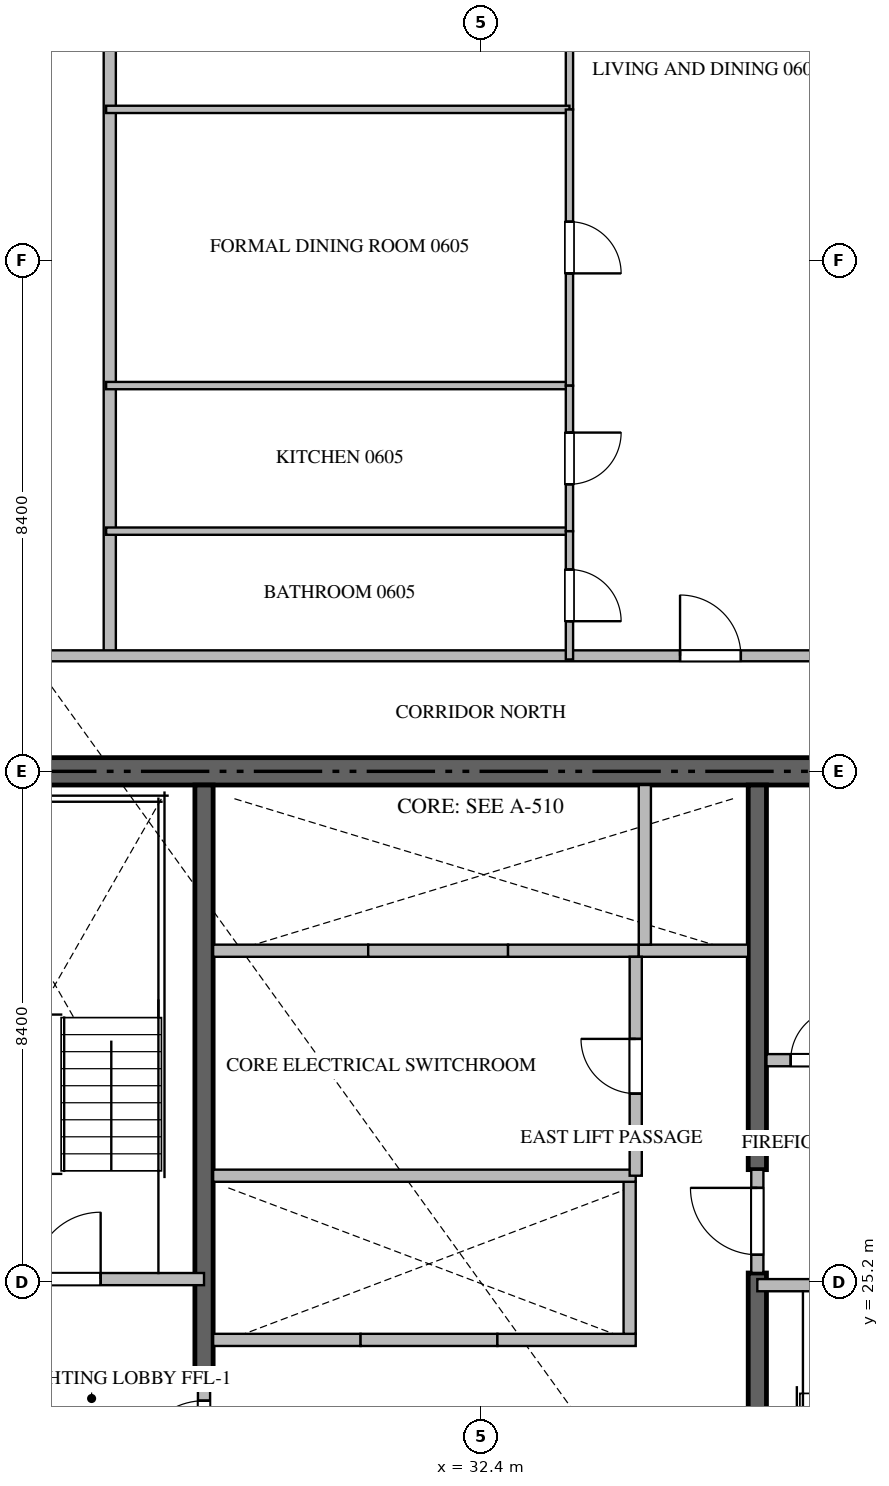
"""IFC4 building model, lengths in metres.
Left out: names, types, materials, properties, quantities, classifications, styles, units other than length and angle.
Written with IfcOpenShell. Run it as: python <this file> out.ifc"""

import sys

from ifc_helpers import new_model, si_unit, direction, frame, frame_2d, origin, place, context, subcontext, project, spatial, rectangle, extrude, source, transform, mapped, element, fill, save


model = new_model("IFC4")
c1 = context("Model", 3, precision=1e-05, world=origin(), true_north=direction((0.0, 1.0)))
c2 = subcontext(c1, "Body", "Model", "MODEL_VIEW")
j1 = project(units=[si_unit("LENGTHUNIT", "METRE"), si_unit("PLANEANGLEUNIT", "RADIAN")], contexts=[c1])
p1 = place(None, origin())
s1 = spatial("IfcSite", under=j1, at=p1, CompositionType="ELEMENT")
p2 = place(p1, origin())
s2 = spatial("IfcBuilding", under=s1, at=p2, CompositionType="ELEMENT")
p3 = place(p2, frame((0.0, 0.0, 30.45)))
s3 = spatial("IfcBuildingStorey", under=s2, at=p3, CompositionType="ELEMENT", Elevation=30.45)
p4 = place(p3, frame((41.4, 33.6, -0.26), z_axis=(0.0, 0.0, 1.0), x_axis=(-1.0, 0.0, 0.0)))
e1 = element("IfcWall", 1, at=p4, inside=s3, PredefinedType="SHEAR", context=c2, shape_type="SweptSolid", body=[
    extrude(rectangle(XDim=18.0, YDim=0.45, at=frame_2d((9.0, 0.0))), origin(), (0.0, 0.0, 1.0), 3.748),
])
p5 = place(p3, frame((27.85, 23.55, -0.26), z_axis=(0.0, 0.0, 1.0), x_axis=(0.0, 1.0, 0.0)))
e2 = element("IfcWall", 2, at=p5, inside=s3, PredefinedType="SHEAR", context=c2, shape_type="SweptSolid", body=[
    extrude(rectangle(XDim=9.825, YDim=0.3, at=frame_2d((4.913, 0.0))), origin(), (0.0, 0.0, 1.0), 3.748),
])
p6 = place(p3, frame((36.95, 17.025, -0.26), z_axis=(0.0, 0.0, 1.0), x_axis=(0.0, 1.0, 0.0)))
e3 = element("IfcWall", 3, at=p6, inside=s3, PredefinedType="SHEAR", context=c2, shape_type="SweptSolid", body=[
    extrude(rectangle(XDim=8.325, YDim=0.3, at=frame_2d((4.163, 0.0))), origin(), (0.0, 0.0, 1.0), 3.748),
])
p7 = place(p3, frame((36.95, 27.05, -0.26), z_axis=(0.0, 0.0, 1.0), x_axis=(0.0, 1.0, 0.0)))
e4 = element("IfcWall", 4, at=p7, inside=s3, PredefinedType="SHEAR", context=c2, shape_type="SweptSolid", body=[
    extrude(rectangle(XDim=6.325, YDim=0.3, at=frame_2d((3.163, 0.0))), origin(), (0.0, 0.0, 1.0), 3.748),
])
p8 = place(p3, frame((23.4, 25.25, 0.0), z_axis=(0.0, 0.0, 1.0), x_axis=(1.0, 0.0, 0.0)))
e5 = element("IfcWall", 5, at=p8, inside=s3, PredefinedType="STANDARD", context=c2, shape_type="SweptSolid", body=[
    extrude(rectangle(XDim=4.45, YDim=0.2, at=frame_2d((2.225, 0.0))), origin(), (0.0, 0.0, 1.0), 3.49),
])
p9 = place(p8, frame((1.65, 0.0, 0.0)))
e6 = element("IfcOpeningElement", 6, at=p9, cuts=e5, PredefinedType="OPENING", context=c2, shape_type="SweptSolid", body=[
    extrude(rectangle(XDim=1.1, YDim=2.15, at=frame_2d((0.55, 1.075))), frame((0.0, 0.11, 0.0), z_axis=(0.0, -1.0, 0.0), x_axis=(1.0, 0.0, 0.0)), (0.0, 0.0, 1.0), 0.22),
])
p10 = place(p3, frame((36.95, 25.15, 0.0), z_axis=(0.0, 0.0, 1.0), x_axis=(1.0, 0.0, 0.0)))
e7 = element("IfcWall", 7, at=p10, inside=s3, PredefinedType="STANDARD", context=c2, shape_type="SweptSolid", body=[
    extrude(rectangle(XDim=4.45, YDim=0.2, at=frame_2d((2.225, 0.0))), origin(), (0.0, 0.0, 1.0), 3.49),
])
p11 = place(p10, frame((1.65, 0.0, 0.0)))
e8 = element("IfcOpeningElement", 8, at=p11, cuts=e7, PredefinedType="OPENING", context=c2, shape_type="SweptSolid", body=[
    extrude(rectangle(XDim=1.1, YDim=2.15, at=frame_2d((0.55, 1.075))), frame((0.0, 0.11, 0.0), z_axis=(0.0, -1.0, 0.0), x_axis=(1.0, 0.0, 0.0)), (0.0, 0.0, 1.0), 0.22),
])
p12 = place(p3, frame((28.0, 24.25, 0.0), z_axis=(0.0, 0.0, 1.0), x_axis=(1.0, 0.0, 0.0)))
e9 = element("IfcWall", 9, at=p12, inside=s3, PredefinedType="STANDARD", context=c2, shape_type="SweptSolid", body=[
    extrude(rectangle(XDim=2.425, YDim=0.2, at=frame_2d((1.212, 0.0))), origin(), (0.0, 0.0, 1.0), 3.49),
])
p13 = place(p3, frame((30.425, 24.25, 0.0), z_axis=(0.0, 0.0, 1.0), x_axis=(1.0, 0.0, 0.0)))
e10 = element("IfcWall", 10, at=p13, inside=s3, PredefinedType="STANDARD", context=c2, shape_type="SweptSolid", body=[
    extrude(rectangle(XDim=2.25, YDim=0.2, at=frame_2d((1.125, 0.0))), origin(), (0.0, 0.0, 1.0), 3.49),
])
p14 = place(p3, frame((32.675, 24.25, 0.0), z_axis=(0.0, 0.0, 1.0), x_axis=(1.0, 0.0, 0.0)))
e11 = element("IfcWall", 11, at=p14, inside=s3, PredefinedType="STANDARD", context=c2, shape_type="SweptSolid", body=[
    extrude(rectangle(XDim=2.275, YDim=0.2, at=frame_2d((1.137, 0.0))), origin(), (0.0, 0.0, 1.0), 3.49),
])
p15 = place(p3, frame((34.85, 24.35, 0.0), z_axis=(0.0, 0.0, 1.0), x_axis=(0.0, 1.0, 0.0)))
e12 = element("IfcWall", 12, at=p15, inside=s3, PredefinedType="STANDARD", context=c2, shape_type="SweptSolid", body=[
    extrude(rectangle(XDim=2.5, YDim=0.2, at=frame_2d((1.25, 0.0))), origin(), (0.0, 0.0, 1.0), 3.49),
])
p16 = place(p3, frame((28.0, 30.65, 0.0), z_axis=(0.0, 0.0, 1.0), x_axis=(1.0, 0.0, 0.0)))
e13 = element("IfcWall", 13, at=p16, inside=s3, PredefinedType="STANDARD", context=c2, shape_type="SweptSolid", body=[
    extrude(rectangle(XDim=2.55, YDim=0.2, at=frame_2d((1.275, 0.0))), origin(), (0.0, 0.0, 1.0), 3.49),
])
p17 = place(p3, frame((30.55, 30.65, 0.0), z_axis=(0.0, 0.0, 1.0), x_axis=(1.0, 0.0, 0.0)))
e14 = element("IfcWall", 14, at=p17, inside=s3, PredefinedType="STANDARD", context=c2, shape_type="SweptSolid", body=[
    extrude(rectangle(XDim=2.3, YDim=0.2, at=frame_2d((1.15, 0.0))), origin(), (0.0, 0.0, 1.0), 3.49),
])
p18 = place(p3, frame((32.85, 30.65, 0.0), z_axis=(0.0, 0.0, 1.0), x_axis=(1.0, 0.0, 0.0)))
e15 = element("IfcWall", 15, at=p18, inside=s3, PredefinedType="STANDARD", context=c2, shape_type="SweptSolid", body=[
    extrude(rectangle(XDim=2.15, YDim=0.2, at=frame_2d((1.075, 0.0))), origin(), (0.0, 0.0, 1.0), 3.49),
])
p19 = place(p3, frame((35.0, 30.65, 0.0), z_axis=(0.0, 0.0, 1.0), x_axis=(1.0, 0.0, 0.0)))
e16 = element("IfcWall", 16, at=p19, inside=s3, PredefinedType="STANDARD", context=c2, shape_type="SweptSolid", body=[
    extrude(rectangle(XDim=1.8, YDim=0.2, at=frame_2d((0.9, 0.0))), origin(), (0.0, 0.0, 1.0), 3.49),
])
p20 = place(p3, frame((35.1, 30.75, 0.0), z_axis=(0.0, 0.0, 1.0), x_axis=(0.0, 1.0, 0.0)))
e17 = element("IfcWall", 17, at=p20, inside=s3, PredefinedType="STANDARD", context=c2, shape_type="SweptSolid", body=[
    extrude(rectangle(XDim=2.625, YDim=0.2, at=frame_2d((1.312, 0.0))), origin(), (0.0, 0.0, 1.0), 3.49),
])
p21 = place(p3, frame((37.1, 28.85, 0.0), z_axis=(0.0, 0.0, 1.0), x_axis=(1.0, 0.0, 0.0)))
e18 = element("IfcWall", 18, at=p21, inside=s3, PredefinedType="STANDARD", context=c2, shape_type="SweptSolid", body=[
    extrude(rectangle(XDim=1.648, YDim=0.2, at=frame_2d((0.824, 0.0))), origin(), (0.0, 0.0, 1.0), 3.49),
])
p22 = place(p21, frame((0.399, 0.0, 0.0)))
e19 = element("IfcOpeningElement", 19, at=p22, cuts=e18, PredefinedType="OPENING", context=c2, shape_type="SweptSolid", body=[
    extrude(rectangle(XDim=0.85, YDim=2.1, at=frame_2d((0.425, 1.05))), frame((0.0, 0.11, 0.0), z_axis=(0.0, -1.0, 0.0), x_axis=(1.0, 0.0, 0.0)), (0.0, 0.0, 1.0), 0.22),
])
p23 = place(p3, frame((27.85, 21.852, 0.0), z_axis=(0.0, 0.0, 1.0), x_axis=(0.0, 1.0, 0.0)))
e20 = element("IfcWall", 20, at=p23, inside=s3, PredefinedType="STANDARD", context=c2, shape_type="SweptSolid", body=[
    extrude(rectangle(XDim=1.696, YDim=0.2, at=frame_2d((0.848, 0.0))), origin(), (0.0, 0.0, 1.0), 3.49),
])
p24 = place(p23, frame((0.298, 0.0, 0.0)))
e21 = element("IfcOpeningElement", 21, at=p24, cuts=e20, PredefinedType="OPENING", context=c2, shape_type="SweptSolid", body=[
    extrude(rectangle(XDim=1.1, YDim=2.15, at=frame_2d((0.55, 1.075))), frame((0.0, 0.11, 0.0), z_axis=(0.0, -1.0, 0.0), x_axis=(1.0, 0.0, 0.0)), (0.0, 0.0, 1.0), 0.22),
])
p25 = place(p3, frame((36.95, 25.352, 0.0), z_axis=(0.0, 0.0, 1.0), x_axis=(0.0, 1.0, 0.0)))
e22 = element("IfcWall", 22, at=p25, inside=s3, PredefinedType="STANDARD", context=c2, shape_type="SweptSolid", body=[
    extrude(rectangle(XDim=1.696, YDim=0.2, at=frame_2d((0.848, 0.0))), origin(), (0.0, 0.0, 1.0), 3.49),
])
p26 = place(p25, frame((0.298, 0.0, 0.0)))
e23 = element("IfcOpeningElement", 23, at=p26, cuts=e22, PredefinedType="OPENING", context=c2, shape_type="SweptSolid", body=[
    extrude(rectangle(XDim=1.1, YDim=2.15, at=frame_2d((0.55, 1.075))), frame((0.0, 0.11, 0.0), z_axis=(0.0, -1.0, 0.0), x_axis=(1.0, 0.0, 0.0)), (0.0, 0.0, 1.0), 0.22),
])
p27 = place(p3, frame((28.0, 26.95, 0.0), z_axis=(0.0, 0.0, 1.0), x_axis=(1.0, 0.0, 0.0)))
e24 = element("IfcWall", 24, at=p27, inside=s3, PredefinedType="STANDARD", context=c2, shape_type="SweptSolid", body=[
    extrude(rectangle(XDim=6.95, YDim=0.2, at=frame_2d((3.475, 0.0))), origin(), (0.0, 0.0, 1.0), 3.49),
])
p28 = place(p3, frame((34.95, 26.95, 0.0), z_axis=(0.0, 0.0, 1.0), x_axis=(0.0, 1.0, 0.0)))
e25 = element("IfcWall", 25, at=p28, inside=s3, PredefinedType="STANDARD", context=c2, shape_type="SweptSolid", body=[
    extrude(rectangle(XDim=3.6, YDim=0.2, at=frame_2d((1.8, 0.0))), origin(), (0.0, 0.0, 1.0), 3.49),
])
p29 = place(p28, frame((1.35, 0.0, 0.0)))
e26 = element("IfcOpeningElement", 26, at=p29, cuts=e25, PredefinedType="OPENING", context=c2, shape_type="SweptSolid", body=[
    extrude(rectangle(XDim=0.9, YDim=2.1, at=frame_2d((0.45, 1.05))), frame((0.0, 0.11, 0.0), z_axis=(0.0, -1.0, 0.0), x_axis=(1.0, 0.0, 0.0)), (0.0, 0.0, 1.0), 0.22),
])
p30 = place(p3, frame((26.3, 35.5, 0.0), z_axis=(0.0, 0.0, 1.0), x_axis=(0.0, 1.0, 0.0)))
e27 = element("IfcWall", 27, at=p30, inside=s3, PredefinedType="PARTITIONING", context=c2, shape_type="SweptSolid", body=[
    extrude(rectangle(XDim=14.618, YDim=0.2, at=frame_2d((7.309, 0.0))), origin(), (0.0, 0.0, 1.0), 3.49),
])
p31 = place(p3, frame((21.402, 35.5, 0.0), z_axis=(0.0, 0.0, 1.0), x_axis=(1.0, 0.0, 0.0)))
e28 = element("IfcWall", 28, at=p31, inside=s3, PredefinedType="PARTITIONING", context=c2, shape_type="SweptSolid", body=[
    extrude(rectangle(XDim=21.996, YDim=0.18, at=frame_2d((10.998, 0.0))), origin(), (0.0, 0.0, 1.0), 3.49),
])
p32 = place(p31, frame((2.1, 0.0, 0.0)))
e29 = element("IfcOpeningElement", 29, at=p32, cuts=e28, PredefinedType="OPENING", context=c2, shape_type="SweptSolid", body=[
    extrude(rectangle(XDim=1.0, YDim=2.15, at=frame_2d((0.5, 1.075))), frame((0.0, 0.1, 0.0), z_axis=(0.0, -1.0, 0.0), x_axis=(1.0, 0.0, 0.0)), (0.0, 0.0, 1.0), 0.2),
])
p33 = place(p31, frame((14.277, 0.0, 0.0)))
e30 = element("IfcOpeningElement", 30, at=p33, cuts=e28, PredefinedType="OPENING", context=c2, shape_type="SweptSolid", body=[
    extrude(rectangle(XDim=1.0, YDim=2.15, at=frame_2d((0.5, 1.075))), frame((0.0, 0.1, 0.0), z_axis=(0.0, -1.0, 0.0), x_axis=(1.0, 0.0, 0.0)), (0.0, 0.0, 1.0), 0.2),
])
p34 = place(p31, frame((18.896, 0.0, 0.0)))
e31 = element("IfcOpeningElement", 31, at=p34, cuts=e28, PredefinedType="OPENING", context=c2, shape_type="SweptSolid", body=[
    extrude(rectangle(XDim=1.0, YDim=2.15, at=frame_2d((0.5, 1.075))), frame((0.0, 0.1, 0.0), z_axis=(0.0, -1.0, 0.0), x_axis=(1.0, 0.0, 0.0)), (0.0, 0.0, 1.0), 0.2),
])
p35 = place(p3, frame((33.86, 50.105, 0.0), z_axis=(0.0, 0.0, 1.0), x_axis=(0.0, -1.0, 0.0)))
e32 = element("IfcWall", 32, at=p35, inside=s3, PredefinedType="PARTITIONING", context=c2, shape_type="SweptSolid", body=[
    extrude(rectangle(XDim=5.619, YDim=0.12, at=frame_2d((2.81, 0.0))), origin(), (0.0, 0.0, 1.0), 3.49),
])
p36 = place(p35, frame((2.595, 0.0, 0.0)))
e33 = element("IfcOpeningElement", 33, at=p36, cuts=e32, PredefinedType="OPENING", context=c2, shape_type="SweptSolid", body=[
    extrude(rectangle(XDim=0.9, YDim=2.1, at=frame_2d((0.45, 1.05))), frame((0.0, 0.07, 0.0), z_axis=(0.0, -1.0, 0.0), x_axis=(1.0, 0.0, 0.0)), (0.0, 0.0, 1.0), 0.14),
])
for number, where, z_axis, x_axis in (
    (34, (26.24, 44.486, 0.0), (0.0, 0.0, 1.0), (1.0, 0.0, 0.0)),
    (35, (26.24, 39.944, 0.0), (0.0, 0.0, 1.0), (1.0, 0.0, 0.0)),
    (36, (26.24, 37.55, 0.0), (0.0, 0.0, 1.0), (1.0, 0.0, 0.0)),
):
    element("IfcWall", number, at=place(p3, frame(where, z_axis=z_axis, x_axis=x_axis)), inside=s3, PredefinedType="PARTITIONING", context=c2, shape_type="SweptSolid", body=[
        extrude(rectangle(XDim=7.62, YDim=0.12, at=frame_2d((3.81, 0.0))), origin(), (0.0, 0.0, 1.0), 3.49),
    ])
p37 = place(p3, frame((33.86, 44.484, 0.0), z_axis=(0.0, 0.0, 1.0), x_axis=(0.0, -1.0, 0.0)))
e37 = element("IfcWall", 37, at=p37, inside=s3, PredefinedType="PARTITIONING", context=c2, shape_type="SweptSolid", body=[
    extrude(rectangle(XDim=4.54, YDim=0.12, at=frame_2d((2.27, 0.0))), origin(), (0.0, 0.0, 1.0), 3.49),
])
p38 = place(p37, frame((1.845, 0.0, 0.0)))
e38 = element("IfcOpeningElement", 38, at=p38, cuts=e37, PredefinedType="OPENING", context=c2, shape_type="SweptSolid", body=[
    extrude(rectangle(XDim=0.85, YDim=2.1, at=frame_2d((0.425, 1.05))), frame((0.0, 0.07, 0.0), z_axis=(0.0, -1.0, 0.0), x_axis=(1.0, 0.0, 0.0)), (0.0, 0.0, 1.0), 0.14),
])
p39 = place(p3, frame((33.86, 39.942, 0.0), z_axis=(0.0, 0.0, 1.0), x_axis=(0.0, -1.0, 0.0)))
e39 = element("IfcWall", 39, at=p39, inside=s3, PredefinedType="PARTITIONING", context=c2, shape_type="SweptSolid", body=[
    extrude(rectangle(XDim=2.392, YDim=0.12, at=frame_2d((1.196, 0.0))), origin(), (0.0, 0.0, 1.0), 3.49),
])
p40 = place(p39, frame((0.771, 0.0, 0.0)))
e40 = element("IfcOpeningElement", 40, at=p40, cuts=e39, PredefinedType="OPENING", context=c2, shape_type="SweptSolid", body=[
    extrude(rectangle(XDim=0.85, YDim=2.1, at=frame_2d((0.425, 1.05))), frame((0.0, 0.07, 0.0), z_axis=(0.0, -1.0, 0.0), x_axis=(1.0, 0.0, 0.0)), (0.0, 0.0, 1.0), 0.14),
])
p41 = place(p3, frame((33.86, 37.548, 0.0), z_axis=(0.0, 0.0, 1.0), x_axis=(0.0, -1.0, 0.0)))
e41 = element("IfcWall", 41, at=p41, inside=s3, PredefinedType="PARTITIONING", context=c2, shape_type="SweptSolid", body=[
    extrude(rectangle(XDim=2.108, YDim=0.12, at=frame_2d((1.054, 0.0))), origin(), (0.0, 0.0, 1.0), 3.49),
])
p42 = place(p41, frame((0.629, 0.0, 0.0)))
e42 = element("IfcOpeningElement", 42, at=p42, cuts=e41, PredefinedType="OPENING", context=c2, shape_type="SweptSolid", body=[
    extrude(rectangle(XDim=0.85, YDim=2.1, at=frame_2d((0.425, 1.05))), frame((0.0, 0.07, 0.0), z_axis=(0.0, -1.0, 0.0), x_axis=(1.0, 0.0, 0.0)), (0.0, 0.0, 1.0), 0.14),
])
m1 = source(origin(), c2, "Body", "SweptSolid", [
    extrude(rectangle(XDim=1.1, YDim=2.15, at=frame_2d((0.55, 1.075))), frame((0.0, 0.025, 0.0), z_axis=(0.0, -1.0, 0.0), x_axis=(1.0, 0.0, 0.0)), (0.0, 0.0, 1.0), 0.05),
])
p43 = place(p9, origin())
e43 = element("IfcDoor", 43, at=p43, inside=s3, OperationType="SINGLE_SWING_RIGHT", PredefinedType="DOOR", context=c2, shape_type="MappedRepresentation", body=[
    mapped(m1, transform((0.0, 0.0, 0.0), scale=1.0)),
])
fill(e6, e43)
m2 = source(origin(), c2, "Body", "SweptSolid", [
    extrude(rectangle(XDim=0.85, YDim=2.1, at=frame_2d((0.425, 1.05))), frame((0.0, 0.025, 0.0), z_axis=(0.0, -1.0, 0.0), x_axis=(1.0, 0.0, 0.0)), (0.0, 0.0, 1.0), 0.05),
])
p44 = place(p22, origin())
e44 = element("IfcDoor", 44, at=p44, inside=s3, OperationType="SINGLE_SWING_RIGHT", PredefinedType="DOOR", context=c2, shape_type="MappedRepresentation", body=[
    mapped(m2, transform((0.0, 0.0, 0.0), scale=1.0)),
])
fill(e19, e44)
p45 = place(p24, origin())
e45 = element("IfcDoor", 45, at=p45, inside=s3, OperationType="SINGLE_SWING_LEFT", PredefinedType="DOOR", context=c2, shape_type="MappedRepresentation", body=[
    mapped(m1, transform((0.0, 0.0, 0.0), scale=1.0)),
])
fill(e21, e45)
p46 = place(p26, origin())
e46 = element("IfcDoor", 46, at=p46, inside=s3, OperationType="SINGLE_SWING_RIGHT", PredefinedType="DOOR", context=c2, shape_type="MappedRepresentation", body=[
    mapped(m1, transform((0.0, 0.0, 0.0), scale=1.0)),
])
fill(e23, e46)
m3 = source(origin(), c2, "Body", "SweptSolid", [
    extrude(rectangle(XDim=0.9, YDim=2.1, at=frame_2d((0.45, 1.05))), frame((0.0, 0.025, 0.0), z_axis=(0.0, -1.0, 0.0), x_axis=(1.0, 0.0, 0.0)), (0.0, 0.0, 1.0), 0.05),
])
p47 = place(p29, origin())
e47 = element("IfcDoor", 47, at=p47, inside=s3, OperationType="SINGLE_SWING_RIGHT", PredefinedType="DOOR", context=c2, shape_type="MappedRepresentation", body=[
    mapped(m3, transform((0.0, 0.0, 0.0), scale=1.0)),
])
fill(e26, e47)
m4 = source(origin(), c2, "Body", "SweptSolid", [
    extrude(rectangle(XDim=1.0, YDim=2.15, at=frame_2d((0.5, 1.075))), frame((0.0, 0.025, 0.0), z_axis=(0.0, -1.0, 0.0), x_axis=(1.0, 0.0, 0.0)), (0.0, 0.0, 1.0), 0.05),
])
p48 = place(p33, origin())
e48 = element("IfcDoor", 48, at=p48, inside=s3, OperationType="SINGLE_SWING_LEFT", PredefinedType="DOOR", context=c2, shape_type="MappedRepresentation", body=[
    mapped(m4, transform((0.0, 0.0, 0.0), scale=1.0)),
])
fill(e30, e48)
p49 = place(p38, origin())
e49 = element("IfcDoor", 49, at=p49, inside=s3, OperationType="SINGLE_SWING_RIGHT", PredefinedType="DOOR", context=c2, shape_type="MappedRepresentation", body=[
    mapped(m2, transform((0.0, 0.0, 0.0), scale=1.0)),
])
fill(e38, e49)
p50 = place(p40, origin())
e50 = element("IfcDoor", 50, at=p50, inside=s3, OperationType="SINGLE_SWING_LEFT", PredefinedType="DOOR", context=c2, shape_type="MappedRepresentation", body=[
    mapped(m2, transform((0.0, 0.0, 0.0), scale=1.0)),
])
fill(e40, e50)
p51 = place(p42, origin())
e51 = element("IfcDoor", 51, at=p51, inside=s3, OperationType="SINGLE_SWING_RIGHT", PredefinedType="DOOR", context=c2, shape_type="MappedRepresentation", body=[
    mapped(m2, transform((0.0, 0.0, 0.0), scale=1.0)),
])
fill(e42, e51)
save(model, sys.argv[1])
